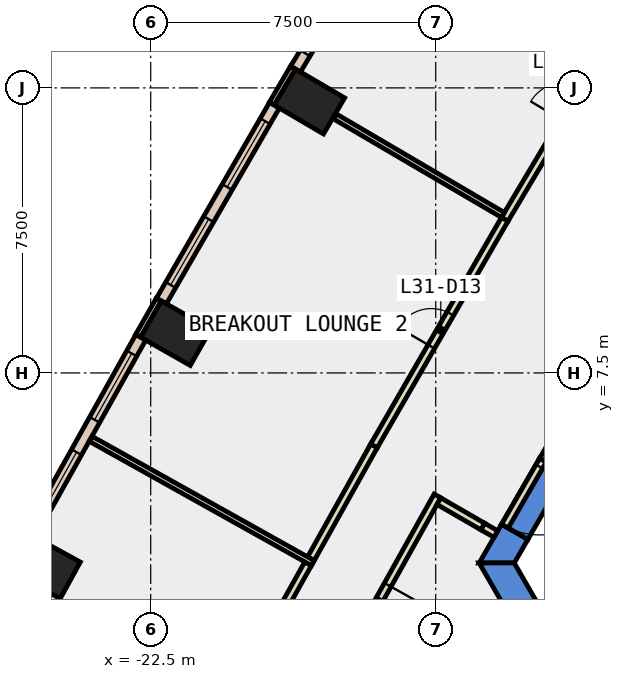
"""IFC4 building model, lengths in metres.
Left out: names, types, materials, properties, quantities, classifications, styles, units other than length and angle.
Written with IfcOpenShell. Run it as: python <this file> out.ifc"""

import sys

from ifc_helpers import new_model, si_unit, direction, frame, frame_2d, origin, origin_2d, place, context, subcontext, project, spatial, polyline, rectangle, outline, extrude, element, fill, save


model = new_model("IFC4")
c1 = context("Model", 3, precision=1e-05, world=origin(), true_north=direction((0.0, 1.0)))
c2 = subcontext(c1, "Body", "Model", "MODEL_VIEW")
j1 = project(units=[si_unit("LENGTHUNIT", "METRE"), si_unit("PLANEANGLEUNIT", "RADIAN")], contexts=[c1])
p1 = place(None, origin())
s1 = spatial("IfcSite", under=j1, at=p1, CompositionType="ELEMENT")
p2 = place(p1, origin())
s2 = spatial("IfcBuilding", under=s1, at=p2, CompositionType="ELEMENT")
p3 = place(p2, frame((0.0, 0.0, 142.4)))
s3 = spatial("IfcBuildingStorey", under=s2, at=p3, CompositionType="ELEMENT", Elevation=142.4)
for number, where, z_axis, x_axis in (
    (1, (-18.322, 14.642, -0.4), (0.0, 0.0, 1.0), (0.506, 0.863, 0.0)),
    (2, (-21.84, 8.546, -0.4), (0.0, 0.0, 1.0), (0.494, 0.869, 0.0)),
    (3, (-25.275, 2.403, -0.4), (0.0, 0.0, 1.0), (0.482, 0.876, 0.0)),
):
    element("IfcColumn", number, at=place(p3, frame(where, z_axis=z_axis, x_axis=x_axis)), inside=s3, PredefinedType="COLUMN", context=c2, shape_type="SweptSolid", body=[
        extrude(rectangle(XDim=1.1, YDim=1.5, at=origin_2d()), origin(), (0.0, 0.0, 1.0), 4.2),
    ])
p4 = place(p3, frame((0.0, 0.0, -0.4)))
e4 = element("IfcWall", 4, at=p4, inside=s3, PredefinedType="SHEAR", context=c2, shape_type="SweptSolid", body=[
    extrude(outline(polyline([(-12.267, 5.252), (-11.575, 4.852), (-6.466, 13.7), (-6.928, 14.5), (-12.267, 5.252)])), origin(), (0.0, 0.0, 1.0), 4.2),
])
p5 = place(p3, frame((0.0, 0.0, -0.4)))
e5 = element("IfcWall", 5, at=p5, inside=s3, PredefinedType="SHEAR", context=c2, shape_type="SweptSolid", body=[
    extrude(outline(polyline([(-12.575, 3.12), (-13.267, 3.52), (-13.856, 2.5), (-12.933, 2.5), (-12.575, 3.12)])), origin(), (0.0, 0.0, 1.0), 4.2),
])
p6 = place(p3, frame((0.0, 0.0, 3.6)))
e6 = element("IfcWall", 6, at=p6, inside=s3, PredefinedType="SHEAR", context=c2, shape_type="SweptSolid", body=[
    extrude(outline(polyline([(-13.267, 3.52), (-12.575, 3.12), (-11.575, 4.852), (-12.267, 5.252), (-13.267, 3.52)])), origin(), (0.0, 0.0, 1.0), 0.2),
])
p7 = place(p3, frame((0.0, 0.0, -0.4)))
e7 = element("IfcWall", 7, at=p7, inside=s3, PredefinedType="SHEAR", context=c2, shape_type="SweptSolid", body=[
    extrude(outline(polyline([(-13.856, 2.5), (-6.928, -9.5), (-6.466, -8.7), (-12.933, 2.5), (-13.856, 2.5)])), origin(), (0.0, 0.0, 1.0), 4.2),
])
p8 = place(p3, frame((-18.755, 15.533, 0.0), z_axis=(0.0, 0.0, 1.0), x_axis=(-0.50667077411, -0.862139621327, 0.0)))
e8 = element("IfcWall", 8, at=p8, inside=s3, PredefinedType="STANDARD", context=c2, shape_type="SweptSolid", body=[
    extrude(rectangle(XDim=1.1, YDim=0.15, at=frame_2d((0.55, 0.0))), origin(), (0.0, 0.0, 1.0), 3.8),
])
p9 = place(p3, frame((-22.286, 9.432, 0.0), z_axis=(0.0, 0.0, 1.0), x_axis=(-0.494775760346, -0.869020682708, 0.0)))
e9 = element("IfcWall", 9, at=p9, inside=s3, PredefinedType="STANDARD", context=c2, shape_type="SweptSolid", body=[
    extrude(rectangle(XDim=1.1, YDim=0.15, at=frame_2d((0.55, 0.0))), origin(), (0.0, 0.0, 1.0), 3.8),
])
p10 = place(p3, frame((-15.642, 20.605, 0.0), z_axis=(0.0, 0.0, 1.0), x_axis=(-0.511856715331, -0.859070836992, 0.0)))
e10 = element("IfcWall", 10, at=p10, inside=s3, PredefinedType="STANDARD", context=c2, shape_type="SweptSolid", body=[
    extrude(rectangle(XDim=5.951, YDim=0.3, at=frame_2d((2.975, 0.0))), origin(), (0.0, 0.0, 1.0), 3.8),
])
p11 = place(p10, frame((0.488, 0.0, 0.9)))
e11 = element("IfcOpeningElement", 11, at=p11, cuts=e10, PredefinedType="OPENING", context=c2, shape_type="SweptSolid", body=[
    extrude(rectangle(XDim=2.0, YDim=2.6, at=frame_2d((1.0, 1.3))), frame((0.0, 0.16, 0.0), z_axis=(0.0, -1.0, 0.0), x_axis=(1.0, 0.0, 0.0)), (0.0, 0.0, 1.0), 0.32),
])
p12 = place(p10, frame((3.463, 0.0, 0.9)))
e12 = element("IfcOpeningElement", 12, at=p12, cuts=e10, PredefinedType="OPENING", context=c2, shape_type="SweptSolid", body=[
    extrude(rectangle(XDim=2.0, YDim=2.6, at=frame_2d((1.0, 1.3))), frame((0.0, 0.16, 0.0), z_axis=(0.0, -1.0, 0.0), x_axis=(1.0, 0.0, 0.0)), (0.0, 0.0, 1.0), 0.32),
])
p13 = place(p3, frame((-19.243, 14.546, 0.0), z_axis=(0.0, 0.0, 1.0), x_axis=(-0.49994263896, -0.866058518664, 0.0)))
e13 = element("IfcWall", 13, at=p13, inside=s3, PredefinedType="STANDARD", context=c2, shape_type="SweptSolid", body=[
    extrude(rectangle(XDim=5.951, YDim=0.3, at=frame_2d((2.976, 0.0))), origin(), (0.0, 0.0, 1.0), 3.8),
])
p14 = place(p13, frame((0.488, 0.0, 0.9)))
e14 = element("IfcOpeningElement", 14, at=p14, cuts=e13, PredefinedType="OPENING", context=c2, shape_type="SweptSolid", body=[
    extrude(rectangle(XDim=2.0, YDim=2.6, at=frame_2d((1.0, 1.3))), frame((0.0, 0.16, 0.0), z_axis=(0.0, -1.0, 0.0), x_axis=(1.0, 0.0, 0.0)), (0.0, 0.0, 1.0), 0.32),
])
p15 = place(p13, frame((3.463, 0.0, 0.9)))
e15 = element("IfcOpeningElement", 15, at=p15, cuts=e13, PredefinedType="OPENING", context=c2, shape_type="SweptSolid", body=[
    extrude(rectangle(XDim=2.0, YDim=2.6, at=frame_2d((1.0, 1.3))), frame((0.0, 0.16, 0.0), z_axis=(0.0, -1.0, 0.0), x_axis=(1.0, 0.0, 0.0)), (0.0, 0.0, 1.0), 0.32),
])
p16 = place(p3, frame((-22.761, 8.438, 0.0), z_axis=(0.0, 0.0, 1.0), x_axis=(-0.488009846284, -0.872838123555, 0.0)))
e16 = element("IfcWall", 16, at=p16, inside=s3, PredefinedType="STANDARD", context=c2, shape_type="SweptSolid", body=[
    extrude(rectangle(XDim=5.951, YDim=0.3, at=frame_2d((2.976, 0.0))), origin(), (0.0, 0.0, 1.0), 3.8),
])
p17 = place(p16, frame((0.488, 0.0, 0.9)))
e17 = element("IfcOpeningElement", 17, at=p17, cuts=e16, PredefinedType="OPENING", context=c2, shape_type="SweptSolid", body=[
    extrude(rectangle(XDim=2.0, YDim=2.6, at=frame_2d((1.0, 1.3))), frame((0.0, 0.16, 0.0), z_axis=(0.0, -1.0, 0.0), x_axis=(1.0, 0.0, 0.0)), (0.0, 0.0, 1.0), 0.32),
])
p18 = place(p16, frame((3.463, 0.0, 0.9)))
e18 = element("IfcOpeningElement", 18, at=p18, cuts=e16, PredefinedType="OPENING", context=c2, shape_type="SweptSolid", body=[
    extrude(rectangle(XDim=2.0, YDim=2.6, at=frame_2d((1.0, 1.3))), frame((0.0, 0.16, 0.0), z_axis=(0.0, -1.0, 0.0), x_axis=(1.0, 0.0, 0.0)), (0.0, 0.0, 1.0), 0.32),
])
p19 = place(p3, frame((-13.417, 3.26, 0.0), z_axis=(0.0, 0.0, 1.0), x_axis=(-0.866398669086, 0.499352927503, 0.0)))
e19 = element("IfcWall", 19, at=p19, inside=s3, PredefinedType="PARTITIONING", context=c2, shape_type="SweptSolid", body=[
    extrude(rectangle(XDim=0.4, YDim=0.2, at=frame_2d((0.2, 0.0))), origin(), (0.0, 0.0, 1.0), 2.4),
])
p20 = place(p3, frame((-14.955, 4.264, 0.0), z_axis=(0.0, 0.0, 1.0), x_axis=(-0.4879770011, -0.872856486713, 0.0)))
e20 = element("IfcWall", 20, at=p20, inside=s3, PredefinedType="PARTITIONING", context=c2, shape_type="SweptSolid", body=[
    extrude(rectangle(XDim=6.363, YDim=0.2, at=frame_2d((3.182, 0.0))), origin(), (0.0, 0.0, 1.0), 3.8),
])
p21 = place(p20, frame((2.681, 0.0, 0.0)))
e21 = element("IfcOpeningElement", 21, at=p21, cuts=e20, PredefinedType="OPENING", context=c2, shape_type="SweptSolid", body=[
    extrude(rectangle(XDim=1.0, YDim=2.1, at=frame_2d((0.5, 1.05))), frame((0.0, 0.11, 0.0), z_axis=(0.0, -1.0, 0.0), x_axis=(1.0, 0.0, 0.0)), (0.0, 0.0, 1.0), 0.22),
])
p22 = place(p3, frame((-13.184, 11.542, 0.0), z_axis=(0.0, 0.0, 1.0), x_axis=(0.511847713534, 0.859076200433, 0.0)))
e22 = element("IfcWall", 22, at=p22, inside=s3, PredefinedType="PARTITIONING", context=c2, shape_type="SweptSolid", body=[
    extrude(rectangle(XDim=7.03, YDim=0.2, at=frame_2d((3.515, 0.0))), origin(), (0.0, 0.0, 1.0), 3.8),
])
p23 = place(p22, frame((3.015, 0.0, 0.0)))
e23 = element("IfcOpeningElement", 23, at=p23, cuts=e22, PredefinedType="OPENING", context=c2, shape_type="SweptSolid", body=[
    extrude(rectangle(XDim=1.0, YDim=2.1, at=frame_2d((0.5, 1.05))), frame((0.0, 0.11, 0.0), z_axis=(0.0, -1.0, 0.0), x_axis=(1.0, 0.0, 0.0)), (0.0, 0.0, 1.0), 0.22),
])
p24 = place(p3, frame((-18.284, 2.612, 0.0), z_axis=(0.0, 0.0, 1.0), x_axis=(0.487871212611, 0.872915620152, 0.0)))
e24 = element("IfcWall", 24, at=p24, inside=s3, PredefinedType="PARTITIONING", context=c2, shape_type="SweptSolid", body=[
    extrude(rectangle(XDim=3.402, YDim=0.2, at=frame_2d((1.701, 0.0))), origin(), (0.0, 0.0, 1.0), 3.8),
])
p25 = place(p3, frame((-16.624, 5.582, 0.0), z_axis=(0.0, 0.0, 1.0), x_axis=(0.499886250151, 0.866091067331, 0.0)))
e25 = element("IfcWall", 25, at=p25, inside=s3, PredefinedType="PARTITIONING", context=c2, shape_type="SweptSolid", body=[
    extrude(rectangle(XDim=6.881, YDim=0.2, at=frame_2d((3.441, 0.0))), origin(), (0.0, 0.0, 1.0), 3.8),
])
p26 = place(p25, frame((3.015, 0.0, 0.0)))
e26 = element("IfcOpeningElement", 26, at=p26, cuts=e25, PredefinedType="OPENING", context=c2, shape_type="SweptSolid", body=[
    extrude(rectangle(XDim=1.0, YDim=2.1, at=frame_2d((0.5, 1.05))), frame((0.0, 0.11, 0.0), z_axis=(0.0, -1.0, 0.0), x_axis=(1.0, 0.0, 0.0)), (0.0, 0.0, 1.0), 0.22),
])
p27 = place(p3, frame((-20.018, -0.489, 0.0), z_axis=(0.0, 0.0, 1.0), x_axis=(0.48792588674, 0.872885060617, 0.0)))
e27 = element("IfcWall", 27, at=p27, inside=s3, PredefinedType="PARTITIONING", context=c2, shape_type="SweptSolid", body=[
    extrude(rectangle(XDim=3.403, YDim=0.2, at=frame_2d((1.701, 0.0))), origin(), (0.0, 0.0, 1.0), 3.8),
])
p28 = place(p3, frame((-13.232, 11.657, 0.0), z_axis=(0.0, 0.0, 1.0), x_axis=(-0.862663606034, 0.505778116197, 0.0)))
e28 = element("IfcWall", 28, at=p28, inside=s3, PredefinedType="PARTITIONING", context=c2, shape_type="SweptSolid", body=[
    extrude(rectangle(XDim=5.131, YDim=0.15, at=frame_2d((2.565, 0.0))), origin(), (0.0, 0.0, 1.0), 3.8),
])
p29 = place(p3, frame((-18.234, 2.497, 0.0), z_axis=(0.0, 0.0, 1.0), x_axis=(-0.872820235044, 0.4880418397, 0.0)))
e29 = element("IfcWall", 29, at=p29, inside=s3, PredefinedType="PARTITIONING", context=c2, shape_type="SweptSolid", body=[
    extrude(rectangle(XDim=6.7, YDim=0.15, at=frame_2d((3.35, 0.0))), origin(), (0.0, 0.0, 1.0), 3.8),
])
p30 = place(p3, frame((-12.18, 5.202, 0.0), z_axis=(0.0, 0.0, 1.0), x_axis=(-0.50002537861, -0.866010750942, 0.0)))
e30 = element("IfcWall", 30, at=p30, inside=s3, PredefinedType="PARTITIONING", context=c2, shape_type="SweptSolid", body=[
    extrude(rectangle(XDim=2.0, YDim=0.2, at=frame_2d((1.0, 0.0))), origin(), (0.0, 0.0, 1.0), 2.4),
])
p31 = place(p30, frame((0.19, 0.0, 0.0)))
e31 = element("IfcOpeningElement", 31, at=p31, cuts=e30, PredefinedType="OPENING", context=c2, shape_type="SweptSolid", body=[
    extrude(rectangle(XDim=1.8, YDim=2.1, at=frame_2d((0.9, 1.05))), frame((0.0, 0.11, 0.0), z_axis=(0.0, -1.0, 0.0), x_axis=(1.0, 0.0, 0.0)), (0.0, 0.0, 1.0), 0.22),
])
p32 = place(p3, frame((-13.764, 3.46, 0.0), z_axis=(0.0, 0.0, 1.0), x_axis=(-0.865932130826, 0.500161518715, 0.0)))
e32 = element("IfcWall", 32, at=p32, inside=s3, PredefinedType="PARTITIONING", context=c2, shape_type="SweptSolid", body=[
    extrude(rectangle(XDim=1.332, YDim=0.2, at=frame_2d((0.666, 0.0))), origin(), (0.0, 0.0, 1.0), 3.8),
])
p33 = place(p12, origin())
e33 = element("IfcWindow", 33, at=p33, inside=s3, PartitioningType="SINGLE_PANEL", PredefinedType="WINDOW", context=c2, shape_type="SweptSolid", body=[
    extrude(rectangle(XDim=2.0, YDim=2.6, at=frame_2d((1.0, 1.3))), frame((0.0, 0.03, 0.0), z_axis=(0.0, -1.0, 0.0), x_axis=(1.0, 0.0, 0.0)), (0.0, 0.0, 1.0), 0.06),
])
fill(e12, e33)
p34 = place(p14, origin())
e34 = element("IfcWindow", 34, at=p34, inside=s3, PartitioningType="SINGLE_PANEL", PredefinedType="WINDOW", context=c2, shape_type="SweptSolid", body=[
    extrude(rectangle(XDim=2.0, YDim=2.6, at=frame_2d((1.0, 1.3))), frame((0.0, 0.03, 0.0), z_axis=(0.0, -1.0, 0.0), x_axis=(1.0, 0.0, 0.0)), (0.0, 0.0, 1.0), 0.06),
])
fill(e14, e34)
p35 = place(p15, origin())
e35 = element("IfcWindow", 35, at=p35, inside=s3, PartitioningType="SINGLE_PANEL", PredefinedType="WINDOW", context=c2, shape_type="SweptSolid", body=[
    extrude(rectangle(XDim=2.0, YDim=2.6, at=frame_2d((1.0, 1.3))), frame((0.0, 0.03, 0.0), z_axis=(0.0, -1.0, 0.0), x_axis=(1.0, 0.0, 0.0)), (0.0, 0.0, 1.0), 0.06),
])
fill(e15, e35)
p36 = place(p17, origin())
e36 = element("IfcWindow", 36, at=p36, inside=s3, PartitioningType="SINGLE_PANEL", PredefinedType="WINDOW", context=c2, shape_type="SweptSolid", body=[
    extrude(rectangle(XDim=2.0, YDim=2.6, at=frame_2d((1.0, 1.3))), frame((0.0, 0.03, 0.0), z_axis=(0.0, -1.0, 0.0), x_axis=(1.0, 0.0, 0.0)), (0.0, 0.0, 1.0), 0.06),
])
fill(e17, e36)
p37 = place(p18, origin())
e37 = element("IfcWindow", 37, at=p37, inside=s3, PartitioningType="SINGLE_PANEL", PredefinedType="WINDOW", context=c2, shape_type="SweptSolid", body=[
    extrude(rectangle(XDim=2.0, YDim=2.6, at=frame_2d((1.0, 1.3))), frame((0.0, 0.03, 0.0), z_axis=(0.0, -1.0, 0.0), x_axis=(1.0, 0.0, 0.0)), (0.0, 0.0, 1.0), 0.06),
])
fill(e18, e37)
p38 = place(p26, origin())
e38 = element("IfcDoor", 38, at=p38, inside=s3, OperationType="SINGLE_SWING_LEFT", PredefinedType="DOOR", context=c2, shape_type="SweptSolid", body=[
    extrude(rectangle(XDim=1.0, YDim=2.1, at=frame_2d((0.5, 1.05))), frame((0.0, 0.025, 0.0), z_axis=(0.0, -1.0, 0.0), x_axis=(1.0, 0.0, 0.0)), (0.0, 0.0, 1.0), 0.05),
])
fill(e26, e38)
p39 = place(p21, origin())
e39 = element("IfcDoor", 39, at=p39, inside=s3, OperationType="SINGLE_SWING_LEFT", PredefinedType="DOOR", context=c2, shape_type="SweptSolid", body=[
    extrude(rectangle(XDim=1.0, YDim=2.1, at=frame_2d((0.5, 1.05))), frame((0.0, 0.025, 0.0), z_axis=(0.0, -1.0, 0.0), x_axis=(1.0, 0.0, 0.0)), (0.0, 0.0, 1.0), 0.05),
])
fill(e21, e39)
p40 = place(p31, origin())
e40 = element("IfcDoor", 40, at=p40, inside=s3, OperationType="DOUBLE_DOOR_SINGLE_SWING", PredefinedType="DOOR", context=c2, shape_type="SweptSolid", body=[
    extrude(rectangle(XDim=1.8, YDim=2.1, at=frame_2d((0.9, 1.05))), frame((0.0, 0.025, 0.0), z_axis=(0.0, -1.0, 0.0), x_axis=(1.0, 0.0, 0.0)), (0.0, 0.0, 1.0), 0.05),
])
fill(e31, e40)
save(model, sys.argv[1])
